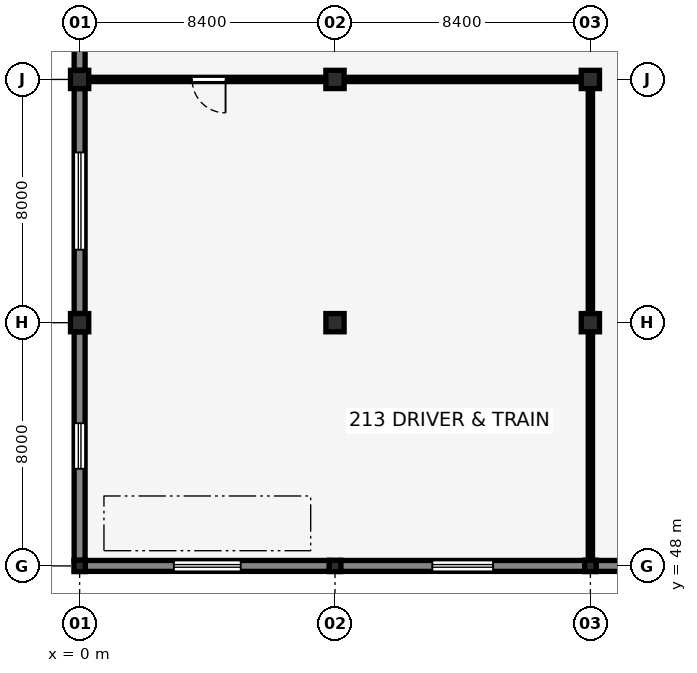
"""IFC4 building model, lengths in metres.
Left out: names, types, materials, properties, quantities, classifications, styles, units other than length and angle.
Written with IfcOpenShell. Run it as: python <this file> out.ifc"""

import sys

from ifc_helpers import new_model, si_unit, direction, frame, frame_2d, origin, origin_2d, place, context, subcontext, project, spatial, rectangle, i_section, extrude, element, fill, save


model = new_model("IFC4")
c1 = context("Model", 3, precision=1e-05, world=origin(), true_north=direction((0.0, 1.0)))
c2 = subcontext(c1, "Body", "Model", "MODEL_VIEW")
j1 = project(units=[si_unit("LENGTHUNIT", "METRE"), si_unit("PLANEANGLEUNIT", "RADIAN")], contexts=[c1])
p1 = place(None, origin())
s1 = spatial("IfcSite", under=j1, at=p1, CompositionType="ELEMENT")
p2 = place(p1, origin())
s2 = spatial("IfcBuilding", under=s1, at=p2, CompositionType="ELEMENT")
p3 = place(p2, frame((0.0, 0.0, 9.52)))
s3 = spatial("IfcBuildingStorey", under=s2, at=p3, CompositionType="ELEMENT", Elevation=9.52)
p4 = place(p3, frame((0.0, 48.0, 0.0), z_axis=(0.0, 0.0, 1.0), x_axis=(1.0, 0.0, 0.0)))
e1 = element("IfcColumn", 1, at=p4, inside=s3, PredefinedType="COLUMN", context=c2, shape_type="SweptSolid", body=[
    extrude(i_section(OverallWidth=0.375, OverallDepth=0.375, WebThickness=0.017, FlangeThickness=0.027, FilletRadius=0.015, at=origin_2d()), origin(), (0.0, 0.0, 1.0), 3.57),
])
for number, where, z_axis, x_axis in (
    (2, (0.0, 56.0, 0.0), (0.0, 0.0, 1.0), (1.0, 0.0, 0.0)),
    (3, (0.0, 64.0, 0.0), (0.0, 0.0, 1.0), (1.0, 0.0, 0.0)),
):
    element("IfcColumn", number, at=place(p3, frame(where, z_axis=z_axis, x_axis=x_axis)), inside=s3, PredefinedType="COLUMN", context=c2, shape_type="SweptSolid", body=[
        extrude(rectangle(XDim=0.6, YDim=0.6, at=origin_2d()), origin(), (0.0, 0.0, 1.0), 3.57),
    ])
p5 = place(p3, frame((8.4, 48.0, 0.0), z_axis=(0.0, 0.0, 1.0), x_axis=(1.0, 0.0, 0.0)))
e4 = element("IfcColumn", 4, at=p5, inside=s3, PredefinedType="COLUMN", context=c2, shape_type="SweptSolid", body=[
    extrude(i_section(OverallWidth=0.375, OverallDepth=0.375, WebThickness=0.017, FlangeThickness=0.027, FilletRadius=0.015, at=origin_2d()), origin(), (0.0, 0.0, 1.0), 3.57),
])
for number, where, z_axis, x_axis in (
    (5, (8.4, 56.0, 0.0), (0.0, 0.0, 1.0), (1.0, 0.0, 0.0)),
    (6, (8.4, 64.0, 0.0), (0.0, 0.0, 1.0), (1.0, 0.0, 0.0)),
):
    element("IfcColumn", number, at=place(p3, frame(where, z_axis=z_axis, x_axis=x_axis)), inside=s3, PredefinedType="COLUMN", context=c2, shape_type="SweptSolid", body=[
        extrude(rectangle(XDim=0.6, YDim=0.6, at=origin_2d()), origin(), (0.0, 0.0, 1.0), 3.57),
    ])
p6 = place(p3, frame((16.8, 48.0, 0.0), z_axis=(0.0, 0.0, 1.0), x_axis=(1.0, 0.0, 0.0)))
e7 = element("IfcColumn", 7, at=p6, inside=s3, PredefinedType="COLUMN", context=c2, shape_type="SweptSolid", body=[
    extrude(i_section(OverallWidth=0.375, OverallDepth=0.375, WebThickness=0.017, FlangeThickness=0.027, FilletRadius=0.015, at=origin_2d()), origin(), (0.0, 0.0, 1.0), 3.57),
])
for number, where, z_axis, x_axis in (
    (8, (16.8, 56.0, 0.0), (0.0, 0.0, 1.0), (1.0, 0.0, 0.0)),
    (9, (16.8, 64.0, 0.0), (0.0, 0.0, 1.0), (1.0, 0.0, 0.0)),
):
    element("IfcColumn", number, at=place(p3, frame(where, z_axis=z_axis, x_axis=x_axis)), inside=s3, PredefinedType="COLUMN", context=c2, shape_type="SweptSolid", body=[
        extrude(rectangle(XDim=0.6, YDim=0.6, at=origin_2d()), origin(), (0.0, 0.0, 1.0), 3.57),
    ])
p7 = place(p3, frame((0.187, 48.0, 0.0), z_axis=(0.0, 0.0, 1.0), x_axis=(1.0, 0.0, 0.0)))
e10 = element("IfcWall", 10, at=p7, inside=s3, PredefinedType="SOLIDWALL", context=c2, shape_type="SweptSolid", body=[
    extrude(rectangle(XDim=8.025, YDim=0.36, at=frame_2d((4.013, 0.0))), origin(), (0.0, 0.0, 1.0), 3.27),
])
p8 = place(p7, frame((2.913, 0.0, 0.9), z_axis=(0.0, 0.0, 1.0), x_axis=(1.0, 0.0, 0.0)))
e11 = element("IfcOpeningElement", 11, at=p8, cuts=e10, PredefinedType="OPENING", context=c2, shape_type="SweptSolid", body=[
    extrude(rectangle(XDim=2.2, YDim=1.5, at=frame_2d((1.1, 0.75))), frame((0.0, 0.19, 0.0), z_axis=(0.0, -1.0, 0.0), x_axis=(1.0, 0.0, 0.0)), (0.0, 0.0, 1.0), 0.38),
])
p9 = place(p3, frame((8.587, 48.0, 0.0), z_axis=(0.0, 0.0, 1.0), x_axis=(1.0, 0.0, 0.0)))
e12 = element("IfcWall", 12, at=p9, inside=s3, PredefinedType="SOLIDWALL", context=c2, shape_type="SweptSolid", body=[
    extrude(rectangle(XDim=8.025, YDim=0.36, at=frame_2d((4.013, 0.0))), origin(), (0.0, 0.0, 1.0), 3.27),
])
p10 = place(p9, frame((3.013, 0.0, 0.9), z_axis=(0.0, 0.0, 1.0), x_axis=(1.0, 0.0, 0.0)))
e13 = element("IfcOpeningElement", 13, at=p10, cuts=e12, PredefinedType="OPENING", context=c2, shape_type="SweptSolid", body=[
    extrude(rectangle(XDim=2.0, YDim=1.5, at=frame_2d((1.0, 0.75))), frame((0.0, 0.19, 0.0), z_axis=(0.0, -1.0, 0.0), x_axis=(1.0, 0.0, 0.0)), (0.0, 0.0, 1.0), 0.38),
])
p11 = place(p3, frame((16.987, 48.0, 0.0), z_axis=(0.0, 0.0, 1.0), x_axis=(1.0, 0.0, 0.0)))
e14 = element("IfcWall", 14, at=p11, inside=s3, PredefinedType="SOLIDWALL", context=c2, shape_type="SweptSolid", body=[
    extrude(rectangle(XDim=8.025, YDim=0.36, at=frame_2d((4.013, 0.0))), origin(), (0.0, 0.0, 1.0), 3.27),
])
p12 = place(p11, frame((3.113, 0.0, 0.9), z_axis=(0.0, 0.0, 1.0), x_axis=(1.0, 0.0, 0.0)))
e15 = element("IfcOpeningElement", 15, at=p12, cuts=e14, PredefinedType="OPENING", context=c2, shape_type="SweptSolid", body=[
    extrude(rectangle(XDim=1.8, YDim=1.45, at=frame_2d((0.9, 0.725))), frame((0.0, 0.19, 0.0), z_axis=(0.0, -1.0, 0.0), x_axis=(1.0, 0.0, 0.0)), (0.0, 0.0, 1.0), 0.38),
])
p13 = place(p3, frame((0.0, 48.187, 0.0), z_axis=(0.0, 0.0, 1.0), x_axis=(0.0, 1.0, 0.0)))
e16 = element("IfcWall", 16, at=p13, inside=s3, PredefinedType="SOLIDWALL", context=c2, shape_type="SweptSolid", body=[
    extrude(rectangle(XDim=7.513, YDim=0.36, at=frame_2d((3.756, 0.0))), origin(), (0.0, 0.0, 1.0), 3.219),
])
p14 = place(p13, frame((3.006, 0.0, 0.9), z_axis=(0.0, 0.0, 1.0), x_axis=(1.0, 0.0, 0.0)))
e17 = element("IfcOpeningElement", 17, at=p14, cuts=e16, PredefinedType="OPENING", context=c2, shape_type="SweptSolid", body=[
    extrude(rectangle(XDim=1.5, YDim=1.4, at=frame_2d((0.75, 0.7))), frame((0.0, 0.19, 0.0), z_axis=(0.0, -1.0, 0.0), x_axis=(1.0, 0.0, 0.0)), (0.0, 0.0, 1.0), 0.38),
])
p15 = place(p3, frame((0.0, 56.3, 0.0), z_axis=(0.0, 0.0, 1.0), x_axis=(0.0, 1.0, 0.0)))
e18 = element("IfcWall", 18, at=p15, inside=s3, PredefinedType="SOLIDWALL", context=c2, shape_type="SweptSolid", body=[
    extrude(rectangle(XDim=7.4, YDim=0.36, at=frame_2d((3.7, 0.0))), origin(), (0.0, 0.0, 1.0), 3.219),
])
p16 = place(p15, frame((2.1, 0.0, 1.55), z_axis=(0.0, 0.0, 1.0), x_axis=(1.0, 0.0, 0.0)))
e19 = element("IfcOpeningElement", 19, at=p16, cuts=e18, PredefinedType="OPENING", context=c2, shape_type="SweptSolid", body=[
    extrude(rectangle(XDim=3.2, YDim=0.9, at=frame_2d((1.6, 0.45))), frame((0.0, 0.19, 0.0), z_axis=(0.0, -1.0, 0.0), x_axis=(1.0, 0.0, 0.0)), (0.0, 0.0, 1.0), 0.38),
])
p17 = place(p3, frame((0.0, 64.3, 0.0), z_axis=(0.0, 0.0, 1.0), x_axis=(0.0, 1.0, 0.0)))
e20 = element("IfcWall", 20, at=p17, inside=s3, PredefinedType="SOLIDWALL", context=c2, shape_type="SweptSolid", body=[
    extrude(rectangle(XDim=7.4, YDim=0.36, at=frame_2d((3.7, 0.0))), origin(), (0.0, 0.0, 1.0), 3.27),
])
p18 = place(p3, frame((0.29, 64.0, 0.0), z_axis=(0.0, 0.0, 1.0), x_axis=(1.0, 0.0, 0.0)))
e21 = element("IfcWall", 21, at=p18, inside=s3, PredefinedType="PARTITIONING", context=c2, shape_type="SweptSolid", body=[
    extrude(rectangle(XDim=7.82, YDim=0.14, at=frame_2d((3.91, 0.0))), origin(), (0.0, 0.0, 1.0), 3.037),
])
p19 = place(p18, frame((4.51, 0.0, 0.0), z_axis=(0.0, 0.0, 1.0), x_axis=(-1.0, 0.0, 0.0)))
e22 = element("IfcOpeningElement", 22, at=p19, cuts=e21, PredefinedType="OPENING", context=c2, shape_type="SweptSolid", body=[
    extrude(rectangle(XDim=1.1, YDim=2.2, at=frame_2d((0.55, 1.1))), frame((0.0, 0.08, 0.0), z_axis=(0.0, -1.0, 0.0), x_axis=(1.0, 0.0, 0.0)), (0.0, 0.0, 1.0), 0.16),
])
p20 = place(p3, frame((8.69, 64.0, 0.0), z_axis=(0.0, 0.0, 1.0), x_axis=(1.0, 0.0, 0.0)))
e23 = element("IfcWall", 23, at=p20, inside=s3, PredefinedType="PARTITIONING", context=c2, shape_type="SweptSolid", body=[
    extrude(rectangle(XDim=7.82, YDim=0.14, at=frame_2d((3.91, 0.0))), origin(), (0.0, 0.0, 1.0), 3.037),
])
p21 = place(p3, frame((16.8, 48.177, 0.0), z_axis=(0.0, 0.0, 1.0), x_axis=(0.0, 1.0, 0.0)))
e24 = element("IfcWall", 24, at=p21, inside=s3, PredefinedType="PARTITIONING", context=c2, shape_type="SweptSolid", body=[
    extrude(rectangle(XDim=7.533, YDim=0.14, at=frame_2d((3.766, 0.0))), origin(), (0.0, 0.0, 1.0), 3.107),
])
p22 = place(p3, frame((16.8, 56.29, 0.0), z_axis=(0.0, 0.0, 1.0), x_axis=(0.0, 1.0, 0.0)))
e25 = element("IfcWall", 25, at=p22, inside=s3, PredefinedType="PARTITIONING", context=c2, shape_type="SweptSolid", body=[
    extrude(rectangle(XDim=7.42, YDim=0.14, at=frame_2d((3.71, 0.0))), origin(), (0.0, 0.0, 1.0), 3.107),
])
p23 = place(p8, origin())
e26 = element("IfcWindow", 26, at=p23, inside=s3, PartitioningType="DOUBLE_PANEL_VERTICAL", PredefinedType="WINDOW", context=c2, shape_type="SweptSolid", body=[
    extrude(rectangle(XDim=2.2, YDim=1.5, at=frame_2d((1.1, 0.75))), frame((0.0, 0.03, 0.0), z_axis=(0.0, -1.0, 0.0), x_axis=(1.0, 0.0, 0.0)), (0.0, 0.0, 1.0), 0.06),
])
fill(e11, e26)
p24 = place(p10, origin())
e27 = element("IfcWindow", 27, at=p24, inside=s3, PartitioningType="DOUBLE_PANEL_VERTICAL", PredefinedType="WINDOW", context=c2, shape_type="SweptSolid", body=[
    extrude(rectangle(XDim=2.0, YDim=1.5, at=frame_2d((1.0, 0.75))), frame((0.0, 0.03, 0.0), z_axis=(0.0, -1.0, 0.0), x_axis=(1.0, 0.0, 0.0)), (0.0, 0.0, 1.0), 0.06),
])
fill(e13, e27)
p25 = place(p14, origin())
e28 = element("IfcWindow", 28, at=p25, inside=s3, PartitioningType="SINGLE_PANEL", PredefinedType="WINDOW", context=c2, shape_type="SweptSolid", body=[
    extrude(rectangle(XDim=1.5, YDim=1.4, at=frame_2d((0.75, 0.7))), frame((0.0, 0.03, 0.0), z_axis=(0.0, -1.0, 0.0), x_axis=(1.0, 0.0, 0.0)), (0.0, 0.0, 1.0), 0.06),
])
fill(e17, e28)
p26 = place(p16, origin())
e29 = element("IfcWindow", 29, at=p26, inside=s3, PartitioningType="TRIPLE_PANEL_HORIZONTAL", PredefinedType="WINDOW", context=c2, shape_type="SweptSolid", body=[
    extrude(rectangle(XDim=3.2, YDim=0.9, at=frame_2d((1.6, 0.45))), frame((0.0, 0.03, 0.0), z_axis=(0.0, -1.0, 0.0), x_axis=(1.0, 0.0, 0.0)), (0.0, 0.0, 1.0), 0.06),
])
fill(e19, e29)
p27 = place(p19, origin())
e30 = element("IfcDoor", 30, at=p27, inside=s3, OperationType="SINGLE_SWING_LEFT", PredefinedType="DOOR", context=c2, shape_type="SweptSolid", body=[
    extrude(rectangle(XDim=1.1, YDim=2.2, at=frame_2d((0.55, 1.1))), frame((0.0, 0.025, 0.0), z_axis=(0.0, -1.0, 0.0), x_axis=(1.0, 0.0, 0.0)), (0.0, 0.0, 1.0), 0.05),
])
fill(e22, e30)
save(model, sys.argv[1])
